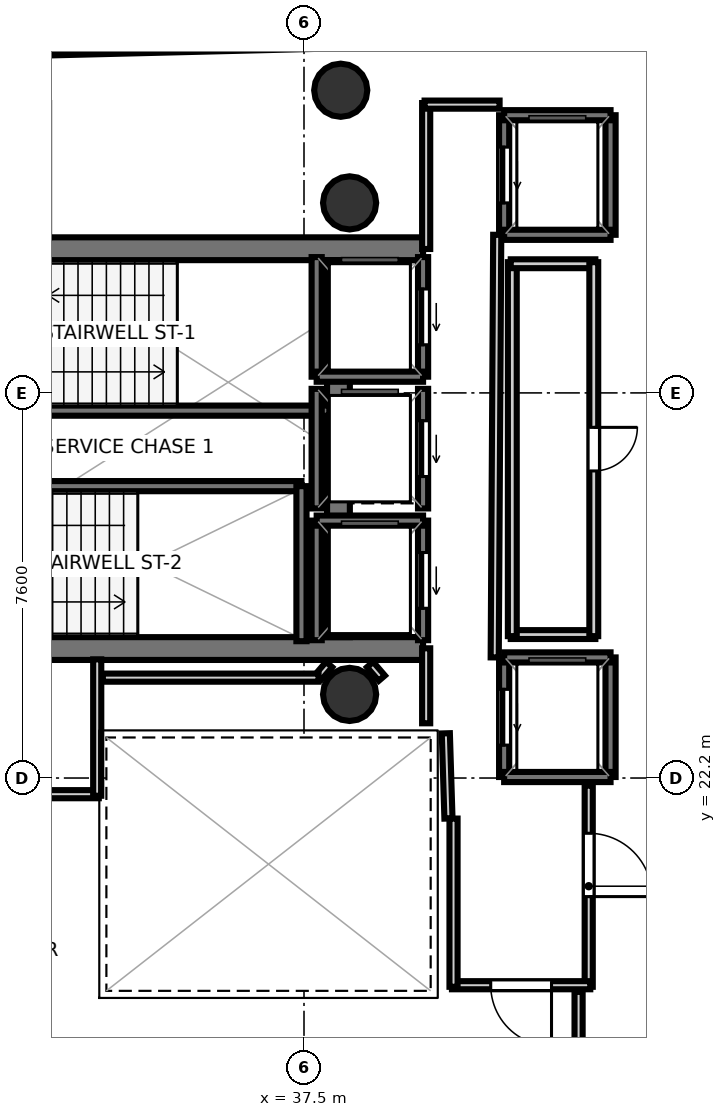
"""IFC4 building model, lengths in metres.
Left out: names, types, materials, properties, quantities, classifications, styles, units other than length and angle.
Written with IfcOpenShell. Run it as: python <this file> out.ifc"""

import sys

from ifc_helpers import new_model, si_unit, direction, frame, frame_2d, origin, origin_2d, place, context, subcontext, project, spatial, rectangle, hollow_circle, extrude, element, fill, save


model = new_model("IFC4")
c1 = context("Model", 3, precision=1e-05, world=origin(), true_north=direction((0.0, 1.0)))
c2 = subcontext(c1, "Body", "Model", "MODEL_VIEW")
j1 = project(units=[si_unit("LENGTHUNIT", "METRE"), si_unit("PLANEANGLEUNIT", "RADIAN")], contexts=[c1])
p1 = place(None, origin())
s1 = spatial("IfcSite", under=j1, at=p1, CompositionType="ELEMENT")
p2 = place(p1, origin())
s2 = spatial("IfcBuilding", under=s1, at=p2, CompositionType="ELEMENT")
p3 = place(p2, frame((0.0, 0.0, 257.5)))
s3 = spatial("IfcBuildingStorey", under=s2, at=p3, CompositionType="ELEMENT", Elevation=257.5)
p4 = place(p3, frame((29.33, 32.645, 0.0), z_axis=(0.0, 0.0, 1.0), x_axis=(1.0, 0.0, 0.0)))
e1 = element("IfcWall", 1, at=p4, inside=s3, PredefinedType="SHEAR", context=c2, shape_type="SweptSolid", body=[
    extrude(rectangle(XDim=10.52, YDim=0.45, at=frame_2d((5.26, 0.0))), origin(), (0.0, 0.0, 1.0), 3.52),
])
p5 = place(p4, frame((0.895, 0.0, 0.0)))
e2 = element("IfcOpeningElement", 2, at=p5, cuts=e1, PredefinedType="OPENING", context=c2, shape_type="SweptSolid", body=[
    extrude(rectangle(XDim=1.25, YDim=2.15, at=frame_2d((0.625, 1.075))), frame((0.0, 0.235, 0.0), z_axis=(0.0, -1.0, 0.0), x_axis=(1.0, 0.0, 0.0)), (0.0, 0.0, 1.0), 0.47),
])
p6 = place(p3, frame((29.33, 24.755, 0.0), z_axis=(0.0, 0.0, 1.0), x_axis=(1.0, 0.0, 0.0)))
e3 = element("IfcWall", 3, at=p6, inside=s3, PredefinedType="SHEAR", context=c2, shape_type="SweptSolid", body=[
    extrude(rectangle(XDim=10.52, YDim=0.45, at=frame_2d((5.26, 0.0))), origin(), (0.0, 0.0, 1.0), 3.52),
])
p7 = place(p6, frame((0.695, 0.0, 0.0)))
e4 = element("IfcOpeningElement", 4, at=p7, cuts=e3, PredefinedType="OPENING", context=c2, shape_type="SweptSolid", body=[
    extrude(rectangle(XDim=1.25, YDim=2.15, at=frame_2d((0.625, 1.075))), frame((0.0, 0.235, 0.0), z_axis=(0.0, -1.0, 0.0), x_axis=(1.0, 0.0, 0.0)), (0.0, 0.0, 1.0), 0.47),
])
p8 = place(p3, frame((38.18, 24.98, 0.0), z_axis=(0.0, 0.0, 1.0), x_axis=(0.0, 1.0, 0.0)))
e5 = element("IfcWall", 5, at=p8, inside=s3, PredefinedType="SHEAR", context=c2, shape_type="SweptSolid", body=[
    extrude(rectangle(XDim=7.44, YDim=0.45, at=frame_2d((3.72, 0.0))), origin(), (0.0, 0.0, 1.0), 3.52),
])
for number, where, z_axis, x_axis in (
    (6, (38.4, 33.55, 0.0), (0.0, 0.0, 1.0), (1.0, 0.0, 0.0)),
    (7, (38.4, 23.85, 0.0), (0.0, 0.0, 1.0), (1.0, 0.0, 0.0)),
    (8, (38.225, 35.773, 0.0), (0.0, 0.0, 1.0), (1.0, 0.0, 0.0)),
):
    element("IfcColumn", number, at=place(p3, frame(where, z_axis=z_axis, x_axis=x_axis)), inside=s3, PredefinedType="COLUMN", context=c2, shape_type="SweptSolid", body=[
        extrude(hollow_circle(Radius=0.525, WallThickness=0.028, at=origin_2d()), origin(), (0.0, 0.0, 1.0), 3.7),
    ])
p9 = place(p3, frame((29.7, 29.45, 0.0), z_axis=(0.0, 0.0, 1.0), x_axis=(1.0, 0.0, 0.0)))
e9 = element("IfcWall", 9, at=p9, inside=s3, PredefinedType="SOLIDWALL", context=c2, shape_type="SweptSolid", body=[
    extrude(rectangle(XDim=8.3, YDim=0.2, at=frame_2d((4.15, 0.0))), origin(), (0.0, 0.0, 1.0), 3.52),
])
p10 = place(p3, frame((29.7, 27.96, 0.0), z_axis=(0.0, 0.0, 1.0), x_axis=(1.0, 0.0, 0.0)))
e10 = element("IfcWall", 10, at=p10, inside=s3, PredefinedType="SOLIDWALL", context=c2, shape_type="SweptSolid", body=[
    extrude(rectangle(XDim=7.75, YDim=0.2, at=frame_2d((3.875, 0.0))), origin(), (0.0, 0.0, 1.0), 3.52),
])
p11 = place(p3, frame((37.45, 24.9, 0.0), z_axis=(0.0, 0.0, 1.0), x_axis=(0.0, 1.0, 0.0)))
e11 = element("IfcWall", 11, at=p11, inside=s3, PredefinedType="SOLIDWALL", context=c2, shape_type="SweptSolid", body=[
    extrude(rectangle(XDim=3.06, YDim=0.2, at=frame_2d((1.53, 0.0))), origin(), (0.0, 0.0, 1.0), 3.52),
])
p12 = place(p3, frame((39.85, 30.12, 0.0), z_axis=(0.0, 0.0, 1.0), x_axis=(0.0, 1.0, 0.0)))
e12 = element("IfcWall", 12, at=p12, inside=s3, PredefinedType="SOLIDWALL", context=c2, shape_type="SweptSolid", body=[
    extrude(rectangle(XDim=2.36, YDim=0.2, at=frame_2d((1.18, 0.0))), origin(), (0.0, 0.0, 1.0), 3.52),
])
p13 = place(p12, frame((0.63, 0.0, 0.0)))
e13 = element("IfcOpeningElement", 13, at=p13, cuts=e12, PredefinedType="OPENING", context=c2, shape_type="SweptSolid", body=[
    extrude(rectangle(XDim=1.1, YDim=2.15, at=frame_2d((0.55, 1.075))), frame((0.0, 0.11, 0.0), z_axis=(0.0, -1.0, 0.0), x_axis=(1.0, 0.0, 0.0)), (0.0, 0.0, 1.0), 0.22),
])
p14 = place(p3, frame((37.75, 30.12, 0.0), z_axis=(0.0, 0.0, 1.0), x_axis=(0.0, 1.0, 0.0)))
e14 = element("IfcWall", 14, at=p14, inside=s3, PredefinedType="SOLIDWALL", context=c2, shape_type="SweptSolid", body=[
    extrude(rectangle(XDim=2.36, YDim=0.2, at=frame_2d((1.18, 0.0))), origin(), (0.0, 0.0, 1.0), 3.52),
])
p15 = place(p3, frame((37.75, 30.12, 0.0), z_axis=(0.0, 0.0, 1.0), x_axis=(1.0, 0.0, 0.0)))
e15 = element("IfcWall", 15, at=p15, inside=s3, PredefinedType="SOLIDWALL", context=c2, shape_type="SweptSolid", body=[
    extrude(rectangle(XDim=2.1, YDim=0.2, at=frame_2d((1.05, 0.0))), origin(), (0.0, 0.0, 1.0), 3.52),
])
p16 = place(p3, frame((39.85, 24.92, 0.0), z_axis=(0.0, 0.0, 1.0), x_axis=(0.0, 1.0, 0.0)))
e16 = element("IfcWall", 16, at=p16, inside=s3, PredefinedType="SOLIDWALL", context=c2, shape_type="SweptSolid", body=[
    extrude(rectangle(XDim=2.36, YDim=0.2, at=frame_2d((1.18, 0.0))), origin(), (0.0, 0.0, 1.0), 3.52),
])
p17 = place(p16, frame((0.63, 0.0, 0.0)))
e17 = element("IfcOpeningElement", 17, at=p17, cuts=e16, PredefinedType="OPENING", context=c2, shape_type="SweptSolid", body=[
    extrude(rectangle(XDim=1.1, YDim=2.15, at=frame_2d((0.55, 1.075))), frame((0.0, 0.11, 0.0), z_axis=(0.0, -1.0, 0.0), x_axis=(1.0, 0.0, 0.0)), (0.0, 0.0, 1.0), 0.22),
])
p18 = place(p3, frame((37.75, 24.92, 0.0), z_axis=(0.0, 0.0, 1.0), x_axis=(0.0, 1.0, 0.0)))
e18 = element("IfcWall", 18, at=p18, inside=s3, PredefinedType="SOLIDWALL", context=c2, shape_type="SweptSolid", body=[
    extrude(rectangle(XDim=2.36, YDim=0.2, at=frame_2d((1.18, 0.0))), origin(), (0.0, 0.0, 1.0), 3.52),
])
p19 = place(p3, frame((37.75, 27.28, 0.0), z_axis=(0.0, 0.0, 1.0), x_axis=(1.0, 0.0, 0.0)))
e19 = element("IfcWall", 19, at=p19, inside=s3, PredefinedType="SOLIDWALL", context=c2, shape_type="SweptSolid", body=[
    extrude(rectangle(XDim=2.1, YDim=0.2, at=frame_2d((1.05, 0.0))), origin(), (0.0, 0.0, 1.0), 3.52),
])
p20 = place(p3, frame((39.85, 27.52, 0.0), z_axis=(0.0, 0.0, 1.0), x_axis=(0.0, 1.0, 0.0)))
e20 = element("IfcWall", 20, at=p20, inside=s3, PredefinedType="SOLIDWALL", context=c2, shape_type="SweptSolid", body=[
    extrude(rectangle(XDim=2.36, YDim=0.2, at=frame_2d((1.18, 0.0))), origin(), (0.0, 0.0, 1.0), 3.52),
])
p21 = place(p20, frame((0.63, 0.0, 0.0)))
e21 = element("IfcOpeningElement", 21, at=p21, cuts=e20, PredefinedType="OPENING", context=c2, shape_type="SweptSolid", body=[
    extrude(rectangle(XDim=1.1, YDim=2.15, at=frame_2d((0.55, 1.075))), frame((0.0, 0.11, 0.0), z_axis=(0.0, -1.0, 0.0), x_axis=(1.0, 0.0, 0.0)), (0.0, 0.0, 1.0), 0.22),
])
p22 = place(p3, frame((37.75, 27.52, 0.0), z_axis=(0.0, 0.0, 1.0), x_axis=(0.0, 1.0, 0.0)))
e22 = element("IfcWall", 22, at=p22, inside=s3, PredefinedType="SOLIDWALL", context=c2, shape_type="SweptSolid", body=[
    extrude(rectangle(XDim=2.36, YDim=0.2, at=frame_2d((1.18, 0.0))), origin(), (0.0, 0.0, 1.0), 3.52),
])
p23 = place(p3, frame((43.55, 22.22, 0.0), z_axis=(0.0, 0.0, 1.0), x_axis=(0.0, 1.0, 0.0)))
e23 = element("IfcWall", 23, at=p23, inside=s3, PredefinedType="SOLIDWALL", context=c2, shape_type="SweptSolid", body=[
    extrude(rectangle(XDim=2.36, YDim=0.2, at=frame_2d((1.18, 0.0))), origin(), (0.0, 0.0, 1.0), 3.52),
])
p24 = place(p3, frame((41.45, 22.22, 0.0), z_axis=(0.0, 0.0, 1.0), x_axis=(0.0, 1.0, 0.0)))
e24 = element("IfcWall", 24, at=p24, inside=s3, PredefinedType="SOLIDWALL", context=c2, shape_type="SweptSolid", body=[
    extrude(rectangle(XDim=2.36, YDim=0.2, at=frame_2d((1.18, 0.0))), origin(), (0.0, 0.0, 1.0), 3.52),
])
p25 = place(p24, frame((0.63, 0.0, 0.0)))
e25 = element("IfcOpeningElement", 25, at=p25, cuts=e24, PredefinedType="OPENING", context=c2, shape_type="SweptSolid", body=[
    extrude(rectangle(XDim=1.1, YDim=2.15, at=frame_2d((0.55, 1.075))), frame((0.0, 0.11, 0.0), z_axis=(0.0, -1.0, 0.0), x_axis=(1.0, 0.0, 0.0)), (0.0, 0.0, 1.0), 0.22),
])
for number, where, z_axis, x_axis in (
    (26, (41.45, 24.58, 0.0), (0.0, 0.0, 1.0), (1.0, 0.0, 0.0)),
    (27, (41.45, 22.22, 0.0), (0.0, 0.0, 1.0), (1.0, 0.0, 0.0)),
):
    element("IfcWall", number, at=place(p3, frame(where, z_axis=z_axis, x_axis=x_axis)), inside=s3, PredefinedType="SOLIDWALL", context=c2, shape_type="SweptSolid", body=[
        extrude(rectangle(XDim=2.1, YDim=0.2, at=frame_2d((1.05, 0.0))), origin(), (0.0, 0.0, 1.0), 3.52),
    ])
p26 = place(p3, frame((43.55, 32.92, 0.0), z_axis=(0.0, 0.0, 1.0), x_axis=(0.0, 1.0, 0.0)))
e28 = element("IfcWall", 28, at=p26, inside=s3, PredefinedType="SOLIDWALL", context=c2, shape_type="SweptSolid", body=[
    extrude(rectangle(XDim=2.36, YDim=0.2, at=frame_2d((1.18, 0.0))), origin(), (0.0, 0.0, 1.0), 3.52),
])
p27 = place(p3, frame((41.45, 32.92, 0.0), z_axis=(0.0, 0.0, 1.0), x_axis=(0.0, 1.0, 0.0)))
e29 = element("IfcWall", 29, at=p27, inside=s3, PredefinedType="SOLIDWALL", context=c2, shape_type="SweptSolid", body=[
    extrude(rectangle(XDim=2.36, YDim=0.2, at=frame_2d((1.18, 0.0))), origin(), (0.0, 0.0, 1.0), 3.52),
])
p28 = place(p27, frame((0.63, 0.0, 0.0)))
e30 = element("IfcOpeningElement", 30, at=p28, cuts=e29, PredefinedType="OPENING", context=c2, shape_type="SweptSolid", body=[
    extrude(rectangle(XDim=1.1, YDim=2.15, at=frame_2d((0.55, 1.075))), frame((0.0, 0.11, 0.0), z_axis=(0.0, -1.0, 0.0), x_axis=(1.0, 0.0, 0.0)), (0.0, 0.0, 1.0), 0.22),
])
for number, where, z_axis, x_axis in (
    (31, (41.45, 35.28, 0.0), (0.0, 0.0, 1.0), (1.0, 0.0, 0.0)),
    (32, (41.45, 32.92, 0.0), (0.0, 0.0, 1.0), (1.0, 0.0, 0.0)),
):
    element("IfcWall", number, at=place(p3, frame(where, z_axis=z_axis, x_axis=x_axis)), inside=s3, PredefinedType="SOLIDWALL", context=c2, shape_type="SweptSolid", body=[
        extrude(rectangle(XDim=2.1, YDim=0.2, at=frame_2d((1.05, 0.0))), origin(), (0.0, 0.0, 1.0), 3.52),
    ])
p29 = place(p3, frame((33.45, 21.881, 0.0), z_axis=(0.0, 0.0, 1.0), x_axis=(-1.0, 0.0, 0.0)))
e33 = element("IfcWall", 33, at=p29, inside=s3, PredefinedType="PARTITIONING", context=c2, shape_type="SweptSolid", body=[
    extrude(rectangle(XDim=3.75, YDim=0.16, at=frame_2d((1.875, 0.0))), origin(), (0.0, 0.0, 1.0), 2.84),
])
p30 = place(p29, frame((1.275, 0.0, 0.0)))
e34 = element("IfcOpeningElement", 34, at=p30, cuts=e33, PredefinedType="OPENING", context=c2, shape_type="SweptSolid", body=[
    extrude(rectangle(XDim=1.2, YDim=2.15, at=frame_2d((0.6, 1.075))), frame((0.0, 0.09, 0.0), z_axis=(0.0, -1.0, 0.0), x_axis=(1.0, 0.0, 0.0)), (0.0, 0.0, 1.0), 0.18),
])
p31 = place(p29, frame((2.66, 0.0, 0.0)))
e35 = element("IfcOpeningElement", 35, at=p31, cuts=e33, PredefinedType="OPENING", context=c2, shape_type="SweptSolid", body=[
    extrude(rectangle(XDim=0.86, YDim=2.05, at=frame_2d((0.43, 1.025))), frame((0.0, 0.09, 0.0), z_axis=(0.0, -1.0, 0.0), x_axis=(1.0, 0.0, 0.0)), (0.0, 0.0, 1.0), 0.18),
])
p32 = place(p3, frame((33.419, 24.542, 0.0), z_axis=(0.0, 0.0, 1.0), x_axis=(0.0, -1.0, 0.0)))
e36 = element("IfcWall", 36, at=p32, inside=s3, PredefinedType="PARTITIONING", context=c2, shape_type="SweptSolid", body=[
    extrude(rectangle(XDim=2.692, YDim=0.16, at=frame_2d((1.346, 0.0))), origin(), (0.0, 0.0, 1.0), 2.84),
])
p33 = place(p3, frame((40.351, 21.401, 0.0), z_axis=(0.0, 0.0, 1.0), x_axis=(-0.031058045979, 0.999517582527, 0.0)))
e37 = element("IfcWall", 37, at=p33, inside=s3, PredefinedType="PARTITIONING", context=c2, shape_type="SweptSolid", body=[
    extrude(rectangle(XDim=1.682, YDim=0.16, at=frame_2d((0.841, 0.0))), origin(), (0.0, 0.0, 1.0), 2.84),
])
p34 = place(p3, frame((39.911, 23.28, 0.0), z_axis=(0.0, 0.0, 1.0), x_axis=(0.0, 1.0, 0.0)))
e38 = element("IfcWall", 38, at=p34, inside=s3, PredefinedType="PARTITIONING", context=c2, shape_type="SweptSolid", body=[
    extrude(rectangle(XDim=1.48, YDim=0.16, at=frame_2d((0.74, 0.0))), origin(), (0.0, 0.0, 1.0), 2.84),
])
p35 = place(p3, frame((39.911, 32.64, 0.0), z_axis=(0.0, 0.0, 1.0), x_axis=(0.0, 1.0, 0.0)))
e39 = element("IfcWall", 39, at=p35, inside=s3, PredefinedType="PARTITIONING", context=c2, shape_type="SweptSolid", body=[
    extrude(rectangle(XDim=2.88, YDim=0.16, at=frame_2d((1.44, 0.0))), origin(), (0.0, 0.0, 1.0), 2.84),
])
p36 = place(p3, frame((39.88, 35.489, 0.0), z_axis=(0.0, 0.0, 1.0), x_axis=(1.0, 0.0, 0.0)))
e40 = element("IfcWall", 40, at=p36, inside=s3, PredefinedType="PARTITIONING", context=c2, shape_type="SweptSolid", body=[
    extrude(rectangle(XDim=1.48, YDim=0.16, at=frame_2d((0.74, 0.0))), origin(), (0.0, 0.0, 1.0), 2.84),
])
p37 = place(p3, frame((41.313, 32.92, 0.0), z_axis=(0.0, 0.0, 1.0), x_axis=(-0.005942518022, -0.999982343084, 0.0)))
e41 = element("IfcWall", 41, at=p37, inside=s3, PredefinedType="PARTITIONING", context=c2, shape_type="SweptSolid", body=[
    extrude(rectangle(XDim=8.34, YDim=0.16, at=frame_2d((4.17, 0.0))), origin(), (0.0, 0.0, 1.0), 2.84),
])
p38 = place(p3, frame((43.119, 22.05, 0.0), z_axis=(0.0, 0.0, 1.0), x_axis=(0.0, -1.0, 0.0)))
e42 = element("IfcWall", 42, at=p38, inside=s3, PredefinedType="PARTITIONING", context=c2, shape_type="SweptSolid", body=[
    extrude(rectangle(XDim=3.97, YDim=0.16, at=frame_2d((1.985, 0.0))), origin(), (0.0, 0.0, 1.0), 2.84),
])
p39 = place(p38, frame((0.94, 0.0, 0.0)))
e43 = element("IfcOpeningElement", 43, at=p39, cuts=e42, PredefinedType="OPENING", context=c2, shape_type="SweptSolid", body=[
    extrude(rectangle(XDim=1.25, YDim=2.2, at=frame_2d((0.625, 1.1))), frame((0.0, 0.09, 0.0), z_axis=(0.0, -1.0, 0.0), x_axis=(1.0, 0.0, 0.0)), (0.0, 0.0, 1.0), 0.18),
])
p40 = place(p3, frame((43.15, 18.111, 0.0), z_axis=(0.0, 0.0, 1.0), x_axis=(-1.0, 0.0, 0.0)))
e44 = element("IfcWall", 44, at=p40, inside=s3, PredefinedType="PARTITIONING", context=c2, shape_type="SweptSolid", body=[
    extrude(rectangle(XDim=2.73, YDim=0.16, at=frame_2d((1.365, 0.0))), origin(), (0.0, 0.0, 1.0), 2.84),
])
p41 = place(p40, frame((0.765, 0.0, 0.0)))
e45 = element("IfcOpeningElement", 45, at=p41, cuts=e44, PredefinedType="OPENING", context=c2, shape_type="SweptSolid", body=[
    extrude(rectangle(XDim=1.2, YDim=2.15, at=frame_2d((0.6, 1.075))), frame((0.0, 0.09, 0.0), z_axis=(0.0, -1.0, 0.0), x_axis=(1.0, 0.0, 0.0)), (0.0, 0.0, 1.0), 0.18),
])
p42 = place(p3, frame((40.451, 18.08, 0.0), z_axis=(0.0, 0.0, 1.0), x_axis=(0.0, 1.0, 0.0)))
e46 = element("IfcWall", 46, at=p42, inside=s3, PredefinedType="PARTITIONING", context=c2, shape_type="SweptSolid", body=[
    extrude(rectangle(XDim=3.32, YDim=0.16, at=frame_2d((1.66, 0.0))), origin(), (0.0, 0.0, 1.0), 2.84),
])
p43 = place(p3, frame((43.25, 25.031, 0.0), z_axis=(0.0, 0.0, 1.0), x_axis=(-1.0, 0.0, 0.0)))
e47 = element("IfcWall", 47, at=p43, inside=s3, PredefinedType="PLUMBINGWALL", context=c2, shape_type="SweptSolid", body=[
    extrude(rectangle(XDim=1.67, YDim=0.175, at=frame_2d((0.835, 0.0))), origin(), (0.0, 0.0, 1.0), 2.84),
])
p44 = place(p3, frame((41.611, 25.0, 0.0), z_axis=(0.0, 0.0, 1.0), x_axis=(0.0, 1.0, 0.0)))
e48 = element("IfcWall", 48, at=p44, inside=s3, PredefinedType="PLUMBINGWALL", context=c2, shape_type="SweptSolid", body=[
    extrude(rectangle(XDim=7.38, YDim=0.175, at=frame_2d((3.69, 0.0))), origin(), (0.0, 0.0, 1.0), 2.84),
])
p45 = place(p3, frame((41.58, 32.349, 0.0), z_axis=(0.0, 0.0, 1.0), x_axis=(1.0, 0.0, 0.0)))
e49 = element("IfcWall", 49, at=p45, inside=s3, PredefinedType="PLUMBINGWALL", context=c2, shape_type="SweptSolid", body=[
    extrude(rectangle(XDim=1.67, YDim=0.175, at=frame_2d((0.835, 0.0))), origin(), (0.0, 0.0, 1.0), 2.84),
])
p46 = place(p3, frame((43.219, 32.38, 0.0), z_axis=(0.0, 0.0, 1.0), x_axis=(0.0, -1.0, 0.0)))
e50 = element("IfcWall", 50, at=p46, inside=s3, PredefinedType="PLUMBINGWALL", context=c2, shape_type="SweptSolid", body=[
    extrude(rectangle(XDim=7.38, YDim=0.175, at=frame_2d((3.69, 0.0))), origin(), (0.0, 0.0, 1.0), 2.84),
])
p47 = place(p46, frame((3.26, 0.0, 0.0)))
e51 = element("IfcOpeningElement", 51, at=p47, cuts=e50, PredefinedType="OPENING", context=c2, shape_type="SweptSolid", body=[
    extrude(rectangle(XDim=0.86, YDim=2.05, at=frame_2d((0.43, 1.025))), frame((0.0, 0.097, 0.0), z_axis=(0.0, -1.0, 0.0), x_axis=(1.0, 0.0, 0.0)), (0.0, 0.0, 1.0), 0.195),
])
p48 = place(p3, frame((39.036, 24.17, 0.0), z_axis=(0.0, 0.0, 1.0), x_axis=(-0.652260263346, 0.757995084984, 0.0)))
e52 = element("IfcWall", 52, at=p48, inside=s3, PredefinedType="PARTITIONING", context=c2, shape_type="SweptSolid", body=[
    extrude(rectangle(XDim=0.355, YDim=0.16, at=frame_2d((0.178, 0.0))), origin(), (0.0, 0.0, 1.0), 2.84),
])
p49 = place(p3, frame((37.996, 24.44, 0.0), z_axis=(0.0, 0.0, 1.0), x_axis=(-0.652425645794, -0.757852740782, 0.0)))
e53 = element("IfcWall", 53, at=p49, inside=s3, PredefinedType="PARTITIONING", context=c2, shape_type="SweptSolid", body=[
    extrude(rectangle(XDim=0.32, YDim=0.16, at=frame_2d((0.16, 0.0))), origin(), (0.0, 0.0, 1.0), 2.84),
])
p50 = place(p3, frame((37.787, 24.181, 0.0), z_axis=(0.0, 0.0, 1.0), x_axis=(-1.0, 0.0, 0.0)))
e54 = element("IfcWall", 54, at=p50, inside=s3, PredefinedType="PARTITIONING", context=c2, shape_type="SweptSolid", body=[
    extrude(rectangle(XDim=4.257, YDim=0.16, at=frame_2d((2.129, 0.0))), origin(), (0.0, 0.0, 1.0), 2.84),
])
p51 = place(p3, frame((42.919, 17.98, 0.0), z_axis=(0.0, 0.0, 1.0), x_axis=(0.0, -1.0, 0.0)))
e55 = element("IfcWall", 55, at=p51, inside=s3, PredefinedType="PARTITIONING", context=c2, shape_type="SweptSolid", body=[
    extrude(rectangle(XDim=2.967, YDim=0.16, at=frame_2d((1.483, 0.0))), origin(), (0.0, 0.0, 1.0), 2.84),
])
p52 = place(p3, frame((21.365, 36.247, 0.0), z_axis=(0.0, 0.0, 1.0), x_axis=(0.999698298545, 0.024562407988, 0.0)))
e56 = element("IfcWall", 56, at=p52, inside=s3, PredefinedType="PARTITIONING", context=c2, shape_type="SweptSolid", body=[
    extrude(rectangle(XDim=35.325, YDim=0.12, at=frame_2d((17.663, 0.0))), origin(), (0.0, 0.0, 1.0), 2.84),
])
p53 = place(p13, origin())
e57 = element("IfcDoor", 57, at=p53, inside=s3, OperationType="SLIDING_TO_LEFT", PredefinedType="DOOR", context=c2, shape_type="SweptSolid", body=[
    extrude(rectangle(XDim=1.1, YDim=2.15, at=frame_2d((0.55, 1.075))), frame((0.0, 0.025, 0.0), z_axis=(0.0, -1.0, 0.0), x_axis=(1.0, 0.0, 0.0)), (0.0, 0.0, 1.0), 0.05),
])
fill(e13, e57)
p54 = place(p17, origin())
e58 = element("IfcDoor", 58, at=p54, inside=s3, OperationType="SLIDING_TO_LEFT", PredefinedType="DOOR", context=c2, shape_type="SweptSolid", body=[
    extrude(rectangle(XDim=1.1, YDim=2.15, at=frame_2d((0.55, 1.075))), frame((0.0, 0.025, 0.0), z_axis=(0.0, -1.0, 0.0), x_axis=(1.0, 0.0, 0.0)), (0.0, 0.0, 1.0), 0.05),
])
fill(e17, e58)
p55 = place(p21, origin())
e59 = element("IfcDoor", 59, at=p55, inside=s3, OperationType="SLIDING_TO_LEFT", PredefinedType="DOOR", context=c2, shape_type="SweptSolid", body=[
    extrude(rectangle(XDim=1.1, YDim=2.15, at=frame_2d((0.55, 1.075))), frame((0.0, 0.025, 0.0), z_axis=(0.0, -1.0, 0.0), x_axis=(1.0, 0.0, 0.0)), (0.0, 0.0, 1.0), 0.05),
])
fill(e21, e59)
p56 = place(p25, origin())
e60 = element("IfcDoor", 60, at=p56, inside=s3, OperationType="SLIDING_TO_LEFT", PredefinedType="DOOR", context=c2, shape_type="SweptSolid", body=[
    extrude(rectangle(XDim=1.1, YDim=2.15, at=frame_2d((0.55, 1.075))), frame((0.0, 0.025, 0.0), z_axis=(0.0, -1.0, 0.0), x_axis=(1.0, 0.0, 0.0)), (0.0, 0.0, 1.0), 0.05),
])
fill(e25, e60)
p57 = place(p28, origin())
e61 = element("IfcDoor", 61, at=p57, inside=s3, OperationType="SLIDING_TO_LEFT", PredefinedType="DOOR", context=c2, shape_type="SweptSolid", body=[
    extrude(rectangle(XDim=1.1, YDim=2.15, at=frame_2d((0.55, 1.075))), frame((0.0, 0.025, 0.0), z_axis=(0.0, -1.0, 0.0), x_axis=(1.0, 0.0, 0.0)), (0.0, 0.0, 1.0), 0.05),
])
fill(e30, e61)
p58 = place(p41, origin())
e62 = element("IfcDoor", 62, at=p58, inside=s3, OperationType="SINGLE_SWING_LEFT", PredefinedType="DOOR", context=c2, shape_type="SweptSolid", body=[
    extrude(rectangle(XDim=1.2, YDim=2.15, at=frame_2d((0.6, 1.075))), frame((0.0, 0.025, 0.0), z_axis=(0.0, -1.0, 0.0), x_axis=(1.0, 0.0, 0.0)), (0.0, 0.0, 1.0), 0.05),
])
fill(e45, e62)
p59 = place(p39, origin())
e63 = element("IfcDoor", 63, at=p59, inside=s3, OperationType="SINGLE_SWING_RIGHT", PredefinedType="DOOR", context=c2, shape_type="SweptSolid", body=[
    extrude(rectangle(XDim=1.25, YDim=2.2, at=frame_2d((0.625, 1.1))), frame((0.0, 0.025, 0.0), z_axis=(0.0, -1.0, 0.0), x_axis=(1.0, 0.0, 0.0)), (0.0, 0.0, 1.0), 0.05),
])
fill(e43, e63)
p60 = place(p47, origin())
e64 = element("IfcDoor", 64, at=p60, inside=s3, OperationType="SINGLE_SWING_LEFT", PredefinedType="DOOR", context=c2, shape_type="SweptSolid", body=[
    extrude(rectangle(XDim=0.86, YDim=2.05, at=frame_2d((0.43, 1.025))), frame((0.0, 0.025, 0.0), z_axis=(0.0, -1.0, 0.0), x_axis=(1.0, 0.0, 0.0)), (0.0, 0.0, 1.0), 0.05),
])
fill(e51, e64)
save(model, sys.argv[1])
